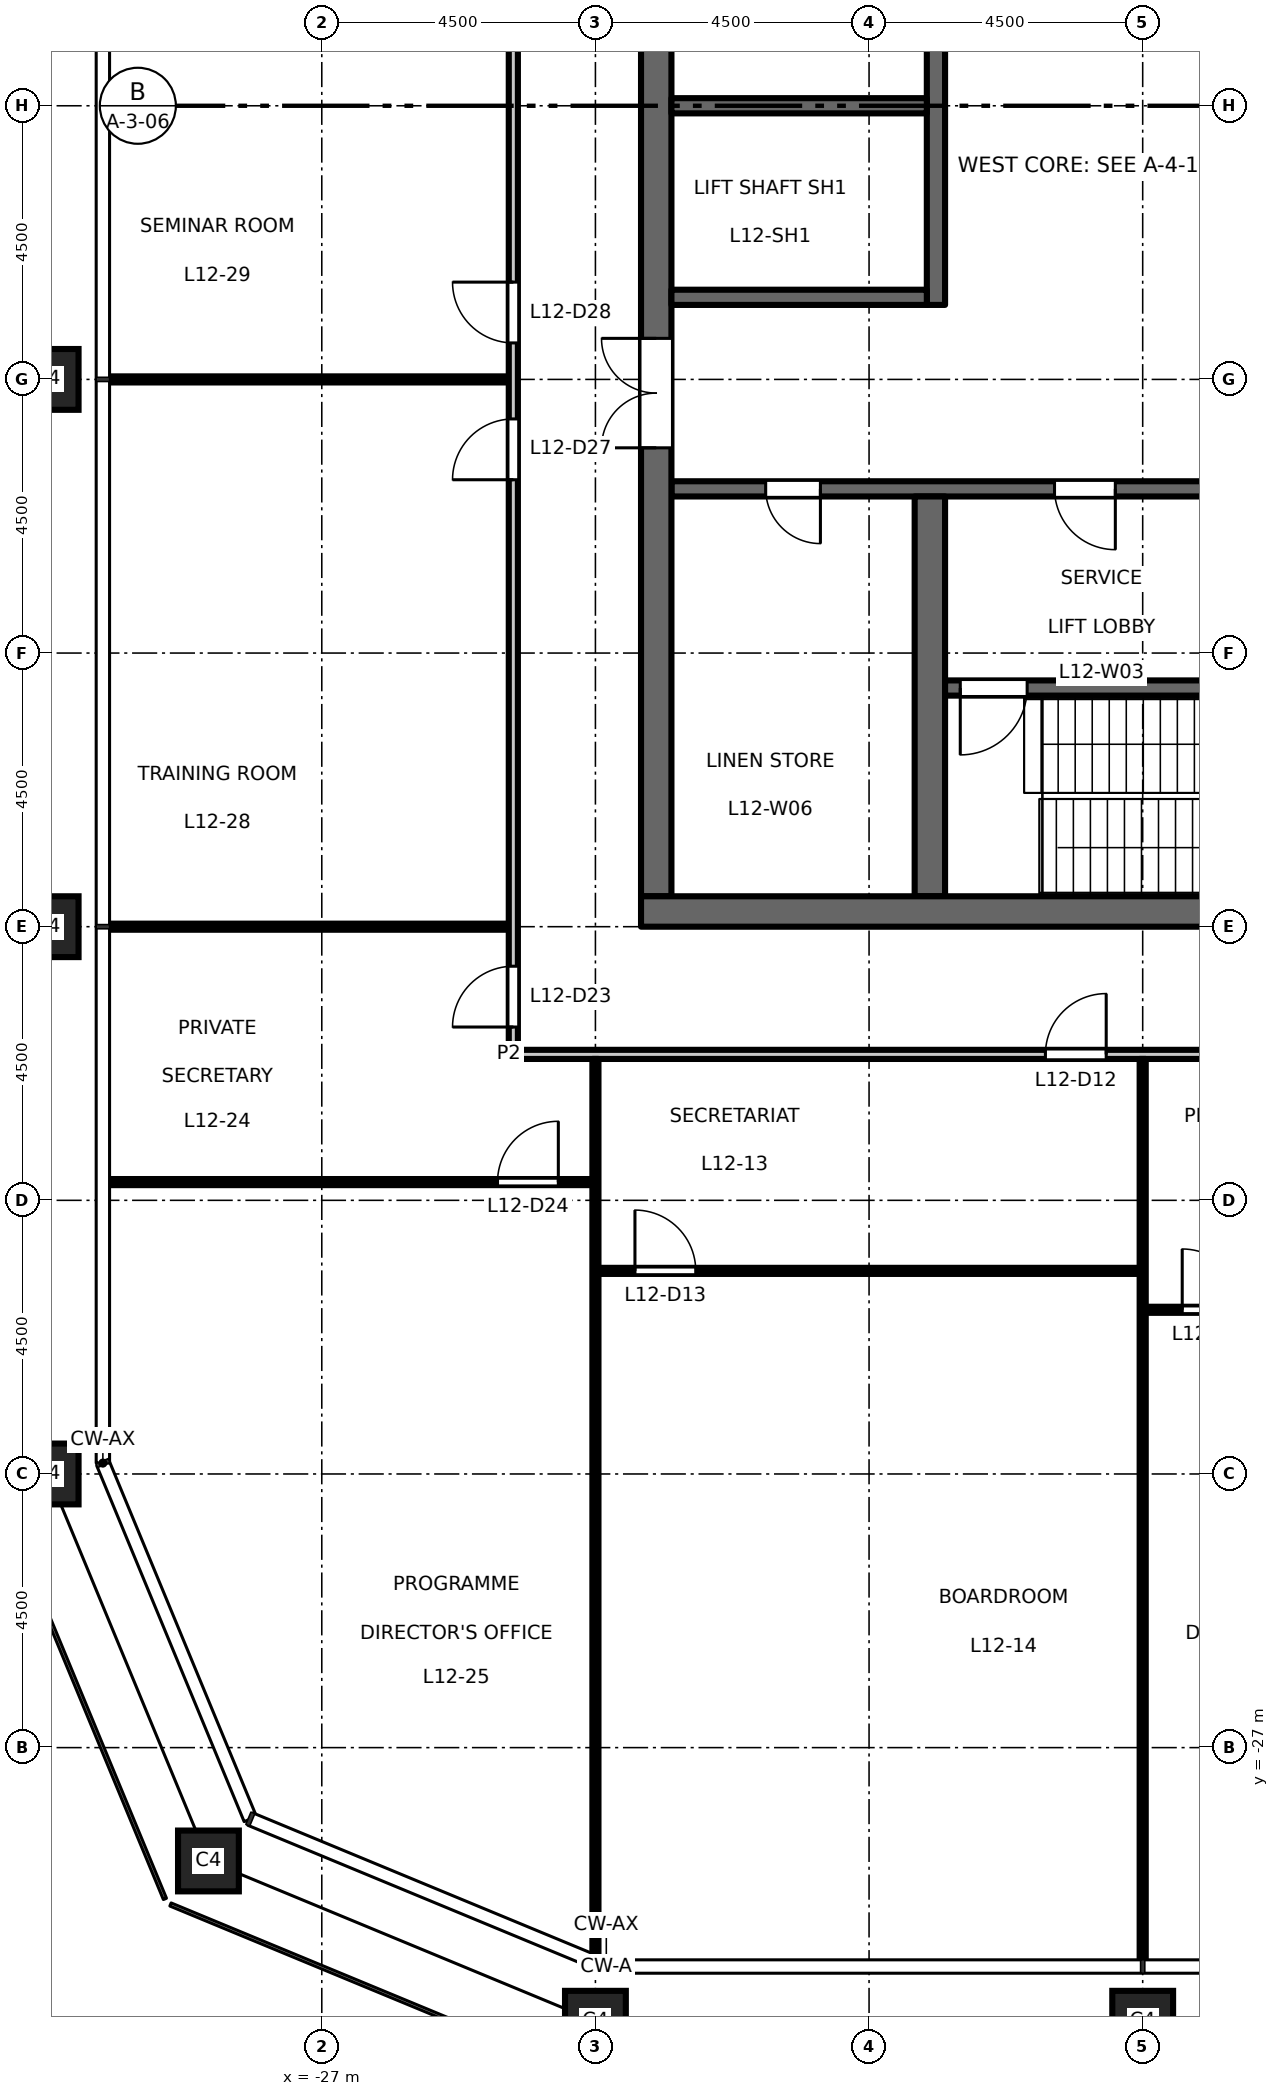
"""IFC4 building model, lengths in metres.
Left out: names, types, materials, properties, quantities, classifications, styles, units other than length and angle.
Written with IfcOpenShell. Run it as: python <this file> out.ifc"""

import sys

from ifc_helpers import new_model, si_unit, direction, frame, frame_2d, origin, origin_2d, place, context, subcontext, project, spatial, rectangle, hollow_rectangle, extrude, element, fill, save


model = new_model("IFC4")
c1 = context("Model", 3, precision=1e-05, world=origin(), true_north=direction((0.0, 1.0)))
c2 = subcontext(c1, "Body", "Model", "MODEL_VIEW")
j1 = project(units=[si_unit("LENGTHUNIT", "METRE"), si_unit("PLANEANGLEUNIT", "RADIAN")], contexts=[c1])
p1 = place(None, origin())
s1 = spatial("IfcSite", under=j1, at=p1, CompositionType="ELEMENT")
p2 = place(p1, origin())
s2 = spatial("IfcBuilding", under=s1, at=p2, CompositionType="ELEMENT")
p3 = place(p2, frame((0.0, 0.0, 58.2)))
s3 = spatial("IfcBuildingStorey", under=s2, at=p3, CompositionType="ELEMENT", Elevation=58.2)
for number, where, z_axis, x_axis in (
    (1, (-22.5, -31.5, 0.0), (0.0, 0.0, 1.0), (1.0, 0.0, 0.0)),
    (2, (-13.5, -31.5, 0.0), (0.0, 0.0, 1.0), (1.0, 0.0, 0.0)),
    (3, (-31.5, -4.5, 0.0), (0.0, 0.0, 1.0), (1.0, 0.0, 0.0)),
    (4, (-31.5, -13.5, 0.0), (0.0, 0.0, 1.0), (1.0, 0.0, 0.0)),
    (5, (-31.5, -22.5, 0.0), (0.0, 0.0, 1.0), (1.0, 0.0, 0.0)),
    (6, (-28.864, -28.864, 0.0), (0.0, 0.0, 1.0), (1.0, 0.0, 0.0)),
):
    element("IfcColumn", number, at=place(p3, frame(where, z_axis=z_axis, x_axis=x_axis)), inside=s3, PredefinedType="COLUMN", context=c2, shape_type="SweptSolid", body=[
        extrude(hollow_rectangle(XDim=1.0, YDim=1.0, WallThickness=0.06, at=origin_2d()), origin(), (0.0, 0.0, 1.0), 4.5),
    ])
p4 = place(p3, frame((-12.15, -6.3, 0.0), z_axis=(0.0, 0.0, 1.0), x_axis=(-1.0, 0.0, 0.0)))
e7 = element("IfcWall", 7, at=p4, inside=s3, PredefinedType="SHEAR", context=c2, shape_type="SweptSolid", body=[
    extrude(rectangle(XDim=9.1, YDim=0.25, at=frame_2d((4.55, 0.0))), origin(), (0.0, 0.0, 1.0), 4.35),
])
p5 = place(p4, frame((1.8, 0.0, 0.0)))
e8 = element("IfcOpeningElement", 8, at=p5, cuts=e7, PredefinedType="OPENING", context=c2, shape_type="SweptSolid", body=[
    extrude(rectangle(XDim=1.0, YDim=2.1, at=frame_2d((0.5, 1.05))), frame((0.0, 0.135, 0.0), z_axis=(0.0, -1.0, 0.0), x_axis=(1.0, 0.0, 0.0)), (0.0, 0.0, 1.0), 0.27),
])
p6 = place(p4, frame((6.65, 0.0, 0.0)))
e9 = element("IfcOpeningElement", 9, at=p6, cuts=e7, PredefinedType="OPENING", context=c2, shape_type="SweptSolid", body=[
    extrude(rectangle(XDim=0.9, YDim=2.1, at=frame_2d((0.45, 1.05))), frame((0.0, 0.135, 0.0), z_axis=(0.0, -1.0, 0.0), x_axis=(1.0, 0.0, 0.0)), (0.0, 0.0, 1.0), 0.27),
])
p7 = place(p3, frame((-21.5, -13.0, 0.0), z_axis=(0.0, 0.0, 1.0), x_axis=(0.0, 1.0, 0.0)))
e10 = element("IfcWall", 10, at=p7, inside=s3, PredefinedType="SHEAR", context=c2, shape_type="SweptSolid", body=[
    extrude(rectangle(XDim=26.0, YDim=0.5, at=frame_2d((13.0, 0.0))), origin(), (0.0, 0.0, 1.0), 4.35),
])
p8 = place(p7, frame((16.825, 0.0, 0.0)))
e11 = element("IfcOpeningElement", 11, at=p8, cuts=e10, PredefinedType="OPENING", context=c2, shape_type="SweptSolid", body=[
    extrude(rectangle(XDim=1.8, YDim=2.1, at=frame_2d((0.9, 1.05))), frame((0.0, 0.26, 0.0), z_axis=(0.0, -1.0, 0.0), x_axis=(1.0, 0.0, 0.0)), (0.0, 0.0, 1.0), 0.52),
])
p9 = place(p7, frame((7.375, 0.0, 0.0)))
e12 = element("IfcOpeningElement", 12, at=p9, cuts=e10, PredefinedType="OPENING", context=c2, shape_type="SweptSolid", body=[
    extrude(rectangle(XDim=1.8, YDim=2.1, at=frame_2d((0.9, 1.05))), frame((0.0, 0.26, 0.0), z_axis=(0.0, -1.0, 0.0), x_axis=(1.0, 0.0, 0.0)), (0.0, 0.0, 1.0), 0.52),
])
p10 = place(p7, frame((23.4, 0.0, 0.0)))
e13 = element("IfcOpeningElement", 13, at=p10, cuts=e10, PredefinedType="OPENING", context=c2, shape_type="SweptSolid", body=[
    extrude(rectangle(XDim=0.9, YDim=2.1, at=frame_2d((0.45, 1.05))), frame((0.0, 0.26, 0.0), z_axis=(0.0, -1.0, 0.0), x_axis=(1.0, 0.0, 0.0)), (0.0, 0.0, 1.0), 0.52),
])
p11 = place(p3, frame((-16.9, -3.275, 0.0), z_axis=(0.0, 0.0, 1.0), x_axis=(0.0, 1.0, 0.0)))
e14 = element("IfcWall", 14, at=p11, inside=s3, PredefinedType="SHEAR", context=c2, shape_type="SweptSolid", body=[
    extrude(rectangle(XDim=6.55, YDim=0.3, at=frame_2d((3.275, 0.0))), origin(), (0.0, 0.0, 1.0), 4.35),
])
for number, where, z_axis, x_axis in (
    (15, (-17.05, 0.0, 0.0), (0.0, 0.0, 1.0), (-1.0, 0.0, 0.0)),
    (16, (-17.05, -3.15, 0.0), (0.0, 0.0, 1.0), (-1.0, 0.0, 0.0)),
):
    element("IfcWall", number, at=place(p3, frame(where, z_axis=z_axis, x_axis=x_axis)), inside=s3, PredefinedType="SHEAR", context=c2, shape_type="SweptSolid", body=[
        extrude(rectangle(XDim=4.2, YDim=0.25, at=frame_2d((2.1, 0.0))), origin(), (0.0, 0.0, 1.0), 4.35),
    ])
p12 = place(p3, frame((-17.0, -13.0, 0.0), z_axis=(0.0, 0.0, 1.0), x_axis=(0.0, 1.0, 0.0)))
e17 = element("IfcWall", 17, at=p12, inside=s3, PredefinedType="SHEAR", context=c2, shape_type="SweptSolid", body=[
    extrude(rectangle(XDim=6.575, YDim=0.5, at=frame_2d((3.288, 0.0))), origin(), (0.0, 0.0, 1.0), 4.35),
])
p13 = place(p3, frame((-8.75, -9.575, 0.0), z_axis=(0.0, 0.0, 1.0), x_axis=(-1.0, 0.0, 0.0)))
e18 = element("IfcWall", 18, at=p13, inside=s3, PredefinedType="SHEAR", context=c2, shape_type="SweptSolid", body=[
    extrude(rectangle(XDim=8.0, YDim=0.25, at=frame_2d((4.0, 0.0))), origin(), (0.0, 0.0, 1.0), 4.35),
])
p14 = place(p13, frame((6.65, 0.0, 0.0)))
e19 = element("IfcOpeningElement", 19, at=p14, cuts=e18, PredefinedType="OPENING", context=c2, shape_type="SweptSolid", body=[
    extrude(rectangle(XDim=1.1, YDim=2.1, at=frame_2d((0.55, 1.05))), frame((0.0, 0.135, 0.0), z_axis=(0.0, -1.0, 0.0), x_axis=(1.0, 0.0, 0.0)), (0.0, 0.0, 1.0), 0.27),
])
p15 = place(p3, frame((-8.25, -13.25, 0.0), z_axis=(0.0, 0.0, 1.0), x_axis=(-1.0, 0.0, 0.0)))
e20 = element("IfcWall", 20, at=p15, inside=s3, PredefinedType="SHEAR", context=c2, shape_type="SweptSolid", body=[
    extrude(rectangle(XDim=13.5, YDim=0.5, at=frame_2d((6.75, 0.0))), origin(), (0.0, 0.0, 1.0), 4.35),
])
p16 = place(p3, frame((-13.45, -19.8, 0.0), z_axis=(0.0, 0.0, 1.0), x_axis=(1.0, 0.0, 0.0)))
e21 = element("IfcWall", 21, at=p16, inside=s3, PredefinedType="PARTITIONING", context=c2, shape_type="SweptSolid", body=[
    extrude(rectangle(XDim=8.9, YDim=0.1, at=frame_2d((4.45, 0.0))), origin(), (0.0, 0.0, 1.0), 4.35),
])
p17 = place(p16, frame((0.6, 0.0, 0.0)))
e22 = element("IfcOpeningElement", 22, at=p17, cuts=e21, PredefinedType="OPENING", context=c2, shape_type="SweptSolid", body=[
    extrude(rectangle(XDim=1.0, YDim=2.1, at=frame_2d((0.5, 1.05))), frame((0.0, 0.06, 0.0), z_axis=(0.0, -1.0, 0.0), x_axis=(1.0, 0.0, 0.0)), (0.0, 0.0, 1.0), 0.12),
])
p18 = place(p3, frame((-22.45, -19.16, 0.0), z_axis=(0.0, 0.0, 1.0), x_axis=(1.0, 0.0, 0.0)))
e23 = element("IfcWall", 23, at=p18, inside=s3, PredefinedType="PARTITIONING", context=c2, shape_type="SweptSolid", body=[
    extrude(rectangle(XDim=8.9, YDim=0.1, at=frame_2d((4.45, 0.0))), origin(), (0.0, 0.0, 1.0), 4.35),
])
p19 = place(p18, frame((0.6, 0.0, 0.0)))
e24 = element("IfcOpeningElement", 24, at=p19, cuts=e23, PredefinedType="OPENING", context=c2, shape_type="SweptSolid", body=[
    extrude(rectangle(XDim=1.0, YDim=2.1, at=frame_2d((0.5, 1.05))), frame((0.0, 0.06, 0.0), z_axis=(0.0, -1.0, 0.0), x_axis=(1.0, 0.0, 0.0)), (0.0, 0.0, 1.0), 0.12),
])
p20 = place(p3, frame((-30.51, -17.7, 0.0), z_axis=(0.0, 0.0, 1.0), x_axis=(1.0, 0.0, 0.0)))
e25 = element("IfcWall", 25, at=p20, inside=s3, PredefinedType="PARTITIONING", context=c2, shape_type="SweptSolid", body=[
    extrude(rectangle(XDim=7.96, YDim=0.1, at=frame_2d((3.98, 0.0))), origin(), (0.0, 0.0, 1.0), 4.35),
])
p21 = place(p20, frame((6.4, 0.0, 0.0)))
e26 = element("IfcOpeningElement", 26, at=p21, cuts=e25, PredefinedType="OPENING", context=c2, shape_type="SweptSolid", body=[
    extrude(rectangle(XDim=1.0, YDim=2.1, at=frame_2d((0.5, 1.05))), frame((0.0, 0.06, 0.0), z_axis=(0.0, -1.0, 0.0), x_axis=(1.0, 0.0, 0.0)), (0.0, 0.0, 1.0), 0.12),
])
p22 = place(p3, frame((-23.925, -15.6, 0.0), z_axis=(0.0, 0.0, 1.0), x_axis=(1.0, 0.0, 0.0)))
e27 = element("IfcWall", 27, at=p22, inside=s3, PredefinedType="PARTITIONING", context=c2, shape_type="SweptSolid", body=[
    extrude(rectangle(XDim=47.85, YDim=0.15, at=frame_2d((23.925, 0.0))), origin(), (0.0, 0.0, 1.0), 4.35),
])
p23 = place(p22, frame((8.825, 0.0, 0.0)))
e28 = element("IfcOpeningElement", 28, at=p23, cuts=e27, PredefinedType="OPENING", context=c2, shape_type="SweptSolid", body=[
    extrude(rectangle(XDim=1.0, YDim=2.1, at=frame_2d((0.5, 1.05))), frame((0.0, 0.085, 0.0), z_axis=(0.0, -1.0, 0.0), x_axis=(1.0, 0.0, 0.0)), (0.0, 0.0, 1.0), 0.17),
])
p24 = place(p22, frame((17.825, 0.0, 0.0)))
e29 = element("IfcOpeningElement", 29, at=p24, cuts=e27, PredefinedType="OPENING", context=c2, shape_type="SweptSolid", body=[
    extrude(rectangle(XDim=1.0, YDim=2.1, at=frame_2d((0.5, 1.05))), frame((0.0, 0.085, 0.0), z_axis=(0.0, -1.0, 0.0), x_axis=(1.0, 0.0, 0.0)), (0.0, 0.0, 1.0), 0.17),
])
p25 = place(p22, frame((26.825, 0.0, 0.0)))
e30 = element("IfcOpeningElement", 30, at=p25, cuts=e27, PredefinedType="OPENING", context=c2, shape_type="SweptSolid", body=[
    extrude(rectangle(XDim=1.0, YDim=2.1, at=frame_2d((0.5, 1.05))), frame((0.0, 0.085, 0.0), z_axis=(0.0, -1.0, 0.0), x_axis=(1.0, 0.0, 0.0)), (0.0, 0.0, 1.0), 0.17),
])
p26 = place(p22, frame((29.075, 0.0, 0.0)))
e31 = element("IfcOpeningElement", 31, at=p26, cuts=e27, PredefinedType="OPENING", context=c2, shape_type="SweptSolid", body=[
    extrude(rectangle(XDim=1.0, YDim=2.1, at=frame_2d((0.5, 1.05))), frame((0.0, 0.085, 0.0), z_axis=(0.0, -1.0, 0.0), x_axis=(1.0, 0.0, 0.0)), (0.0, 0.0, 1.0), 0.17),
])
p27 = place(p22, frame((44.825, 0.0, 0.0)))
e32 = element("IfcOpeningElement", 32, at=p27, cuts=e27, PredefinedType="OPENING", context=c2, shape_type="SweptSolid", body=[
    extrude(rectangle(XDim=1.0, YDim=2.1, at=frame_2d((0.5, 1.05))), frame((0.0, 0.085, 0.0), z_axis=(0.0, -1.0, 0.0), x_axis=(1.0, 0.0, 0.0)), (0.0, 0.0, 1.0), 0.17),
])
p28 = place(p3, frame((-30.51, -13.5, 0.0), z_axis=(0.0, 0.0, 1.0), x_axis=(1.0, 0.0, 0.0)))
e33 = element("IfcWall", 33, at=p28, inside=s3, PredefinedType="PARTITIONING", context=c2, shape_type="SweptSolid", body=[
    extrude(rectangle(XDim=6.585, YDim=0.1, at=frame_2d((3.292, 0.0))), origin(), (0.0, 0.0, 1.0), 3.35),
])
p29 = place(p3, frame((-30.51, -4.5, 0.0), z_axis=(0.0, 0.0, 1.0), x_axis=(1.0, 0.0, 0.0)))
e34 = element("IfcWall", 34, at=p29, inside=s3, PredefinedType="PARTITIONING", context=c2, shape_type="SweptSolid", body=[
    extrude(rectangle(XDim=6.585, YDim=0.1, at=frame_2d((3.292, 0.0))), origin(), (0.0, 0.0, 1.0), 4.35),
])
p30 = place(p3, frame((-23.85, -15.525, 0.0), z_axis=(0.0, 0.0, 1.0), x_axis=(0.0, 1.0, 0.0)))
e35 = element("IfcWall", 35, at=p30, inside=s3, PredefinedType="PARTITIONING", context=c2, shape_type="SweptSolid", body=[
    extrude(rectangle(XDim=31.05, YDim=0.15, at=frame_2d((15.525, 0.0))), origin(), (0.0, 0.0, 1.0), 4.35),
])
p31 = place(p30, frame((29.475, 0.0, 0.0)))
e36 = element("IfcOpeningElement", 36, at=p31, cuts=e35, PredefinedType="OPENING", context=c2, shape_type="SweptSolid", body=[
    extrude(rectangle(XDim=1.0, YDim=2.1, at=frame_2d((0.5, 1.05))), frame((0.0, 0.085, 0.0), z_axis=(0.0, -1.0, 0.0), x_axis=(1.0, 0.0, 0.0)), (0.0, 0.0, 1.0), 0.17),
])
p32 = place(p30, frame((0.375, 0.0, 0.0)))
e37 = element("IfcOpeningElement", 37, at=p32, cuts=e35, PredefinedType="OPENING", context=c2, shape_type="SweptSolid", body=[
    extrude(rectangle(XDim=1.0, YDim=2.1, at=frame_2d((0.5, 1.05))), frame((0.0, 0.085, 0.0), z_axis=(0.0, -1.0, 0.0), x_axis=(1.0, 0.0, 0.0)), (0.0, 0.0, 1.0), 0.17),
])
p33 = place(p30, frame((9.375, 0.0, 0.0)))
e38 = element("IfcOpeningElement", 38, at=p33, cuts=e35, PredefinedType="OPENING", context=c2, shape_type="SweptSolid", body=[
    extrude(rectangle(XDim=1.0, YDim=2.1, at=frame_2d((0.5, 1.05))), frame((0.0, 0.085, 0.0), z_axis=(0.0, -1.0, 0.0), x_axis=(1.0, 0.0, 0.0)), (0.0, 0.0, 1.0), 0.17),
])
p34 = place(p30, frame((11.625, 0.0, 0.0)))
e39 = element("IfcOpeningElement", 39, at=p34, cuts=e35, PredefinedType="OPENING", context=c2, shape_type="SweptSolid", body=[
    extrude(rectangle(XDim=1.0, YDim=2.1, at=frame_2d((0.5, 1.05))), frame((0.0, 0.085, 0.0), z_axis=(0.0, -1.0, 0.0), x_axis=(1.0, 0.0, 0.0)), (0.0, 0.0, 1.0), 0.17),
])
p35 = place(p30, frame((27.375, 0.0, 0.0)))
e40 = element("IfcOpeningElement", 40, at=p35, cuts=e35, PredefinedType="OPENING", context=c2, shape_type="SweptSolid", body=[
    extrude(rectangle(XDim=1.0, YDim=2.1, at=frame_2d((0.5, 1.05))), frame((0.0, 0.085, 0.0), z_axis=(0.0, -1.0, 0.0), x_axis=(1.0, 0.0, 0.0)), (0.0, 0.0, 1.0), 0.17),
])
p36 = place(p3, frame((-22.5, -30.428, 0.0), z_axis=(0.0, 0.0, 1.0), x_axis=(0.0, 1.0, 0.0)))
e41 = element("IfcWall", 41, at=p36, inside=s3, PredefinedType="PARTITIONING", context=c2, shape_type="SweptSolid", body=[
    extrude(rectangle(XDim=14.753, YDim=0.1, at=frame_2d((7.376, 0.0))), origin(), (0.0, 0.0, 1.0), 3.35),
])
p37 = place(p3, frame((-13.5, -30.51, 0.0), z_axis=(0.0, 0.0, 1.0), x_axis=(0.0, 1.0, 0.0)))
e42 = element("IfcWall", 42, at=p37, inside=s3, PredefinedType="PARTITIONING", context=c2, shape_type="SweptSolid", body=[
    extrude(rectangle(XDim=14.835, YDim=0.1, at=frame_2d((7.417, 0.0))), origin(), (0.0, 0.0, 1.0), 3.35),
])
p38 = place(p5, origin())
e43 = element("IfcDoor", 43, at=p38, inside=s3, OperationType="SINGLE_SWING_RIGHT", PredefinedType="DOOR", context=c2, shape_type="SweptSolid", body=[
    extrude(rectangle(XDim=1.0, YDim=2.1, at=frame_2d((0.5, 1.05))), frame((0.0, 0.025, 0.0), z_axis=(0.0, -1.0, 0.0), x_axis=(1.0, 0.0, 0.0)), (0.0, 0.0, 1.0), 0.05),
])
fill(e8, e43)
p39 = place(p14, origin())
e44 = element("IfcDoor", 44, at=p39, inside=s3, OperationType="SINGLE_SWING_LEFT", PredefinedType="DOOR", context=c2, shape_type="SweptSolid", body=[
    extrude(rectangle(XDim=1.1, YDim=2.1, at=frame_2d((0.55, 1.05))), frame((0.0, 0.025, 0.0), z_axis=(0.0, -1.0, 0.0), x_axis=(1.0, 0.0, 0.0)), (0.0, 0.0, 1.0), 0.05),
])
fill(e19, e44)
p40 = place(p9, origin())
e45 = element("IfcDoor", 45, at=p40, inside=s3, OperationType="DOUBLE_DOOR_DOUBLE_SWING", PredefinedType="DOOR", context=c2, shape_type="SweptSolid", body=[
    extrude(rectangle(XDim=1.8, YDim=2.1, at=frame_2d((0.9, 1.05))), frame((0.0, 0.025, 0.0), z_axis=(0.0, -1.0, 0.0), x_axis=(1.0, 0.0, 0.0)), (0.0, 0.0, 1.0), 0.05),
])
fill(e12, e45)
p41 = place(p6, origin())
e46 = element("IfcDoor", 46, at=p41, inside=s3, OperationType="SINGLE_SWING_RIGHT", PredefinedType="DOOR", context=c2, shape_type="SweptSolid", body=[
    extrude(rectangle(XDim=0.9, YDim=2.1, at=frame_2d((0.45, 1.05))), frame((0.0, 0.025, 0.0), z_axis=(0.0, -1.0, 0.0), x_axis=(1.0, 0.0, 0.0)), (0.0, 0.0, 1.0), 0.05),
])
fill(e9, e46)
p42 = place(p23, origin())
e47 = element("IfcDoor", 47, at=p42, inside=s3, OperationType="SINGLE_SWING_RIGHT", PredefinedType="DOOR", context=c2, shape_type="SweptSolid", body=[
    extrude(rectangle(XDim=1.0, YDim=2.1, at=frame_2d((0.5, 1.05))), frame((0.0, 0.025, 0.0), z_axis=(0.0, -1.0, 0.0), x_axis=(1.0, 0.0, 0.0)), (0.0, 0.0, 1.0), 0.05),
])
fill(e28, e47)
p43 = place(p19, origin())
e48 = element("IfcDoor", 48, at=p43, inside=s3, OperationType="SINGLE_SWING_LEFT", PredefinedType="DOOR", context=c2, shape_type="SweptSolid", body=[
    extrude(rectangle(XDim=1.0, YDim=2.1, at=frame_2d((0.5, 1.05))), frame((0.0, 0.025, 0.0), z_axis=(0.0, -1.0, 0.0), x_axis=(1.0, 0.0, 0.0)), (0.0, 0.0, 1.0), 0.05),
])
fill(e24, e48)
p44 = place(p17, origin())
e49 = element("IfcDoor", 49, at=p44, inside=s3, OperationType="SINGLE_SWING_LEFT", PredefinedType="DOOR", context=c2, shape_type="SweptSolid", body=[
    extrude(rectangle(XDim=1.0, YDim=2.1, at=frame_2d((0.5, 1.05))), frame((0.0, 0.025, 0.0), z_axis=(0.0, -1.0, 0.0), x_axis=(1.0, 0.0, 0.0)), (0.0, 0.0, 1.0), 0.05),
])
fill(e22, e49)
p45 = place(p32, origin())
e50 = element("IfcDoor", 50, at=p45, inside=s3, OperationType="SINGLE_SWING_LEFT", PredefinedType="DOOR", context=c2, shape_type="SweptSolid", body=[
    extrude(rectangle(XDim=1.0, YDim=2.1, at=frame_2d((0.5, 1.05))), frame((0.0, 0.025, 0.0), z_axis=(0.0, -1.0, 0.0), x_axis=(1.0, 0.0, 0.0)), (0.0, 0.0, 1.0), 0.05),
])
fill(e37, e50)
p46 = place(p21, origin())
e51 = element("IfcDoor", 51, at=p46, inside=s3, OperationType="SINGLE_SWING_RIGHT", PredefinedType="DOOR", context=c2, shape_type="SweptSolid", body=[
    extrude(rectangle(XDim=1.0, YDim=2.1, at=frame_2d((0.5, 1.05))), frame((0.0, 0.025, 0.0), z_axis=(0.0, -1.0, 0.0), x_axis=(1.0, 0.0, 0.0)), (0.0, 0.0, 1.0), 0.05),
])
fill(e26, e51)
p47 = place(p33, origin())
e52 = element("IfcDoor", 52, at=p47, inside=s3, OperationType="SINGLE_SWING_LEFT", PredefinedType="DOOR", context=c2, shape_type="SweptSolid", body=[
    extrude(rectangle(XDim=1.0, YDim=2.1, at=frame_2d((0.5, 1.05))), frame((0.0, 0.025, 0.0), z_axis=(0.0, -1.0, 0.0), x_axis=(1.0, 0.0, 0.0)), (0.0, 0.0, 1.0), 0.05),
])
fill(e38, e52)
p48 = place(p34, origin())
e53 = element("IfcDoor", 53, at=p48, inside=s3, OperationType="SINGLE_SWING_RIGHT", PredefinedType="DOOR", context=c2, shape_type="SweptSolid", body=[
    extrude(rectangle(XDim=1.0, YDim=2.1, at=frame_2d((0.5, 1.05))), frame((0.0, 0.025, 0.0), z_axis=(0.0, -1.0, 0.0), x_axis=(1.0, 0.0, 0.0)), (0.0, 0.0, 1.0), 0.05),
])
fill(e39, e53)
save(model, sys.argv[1])
